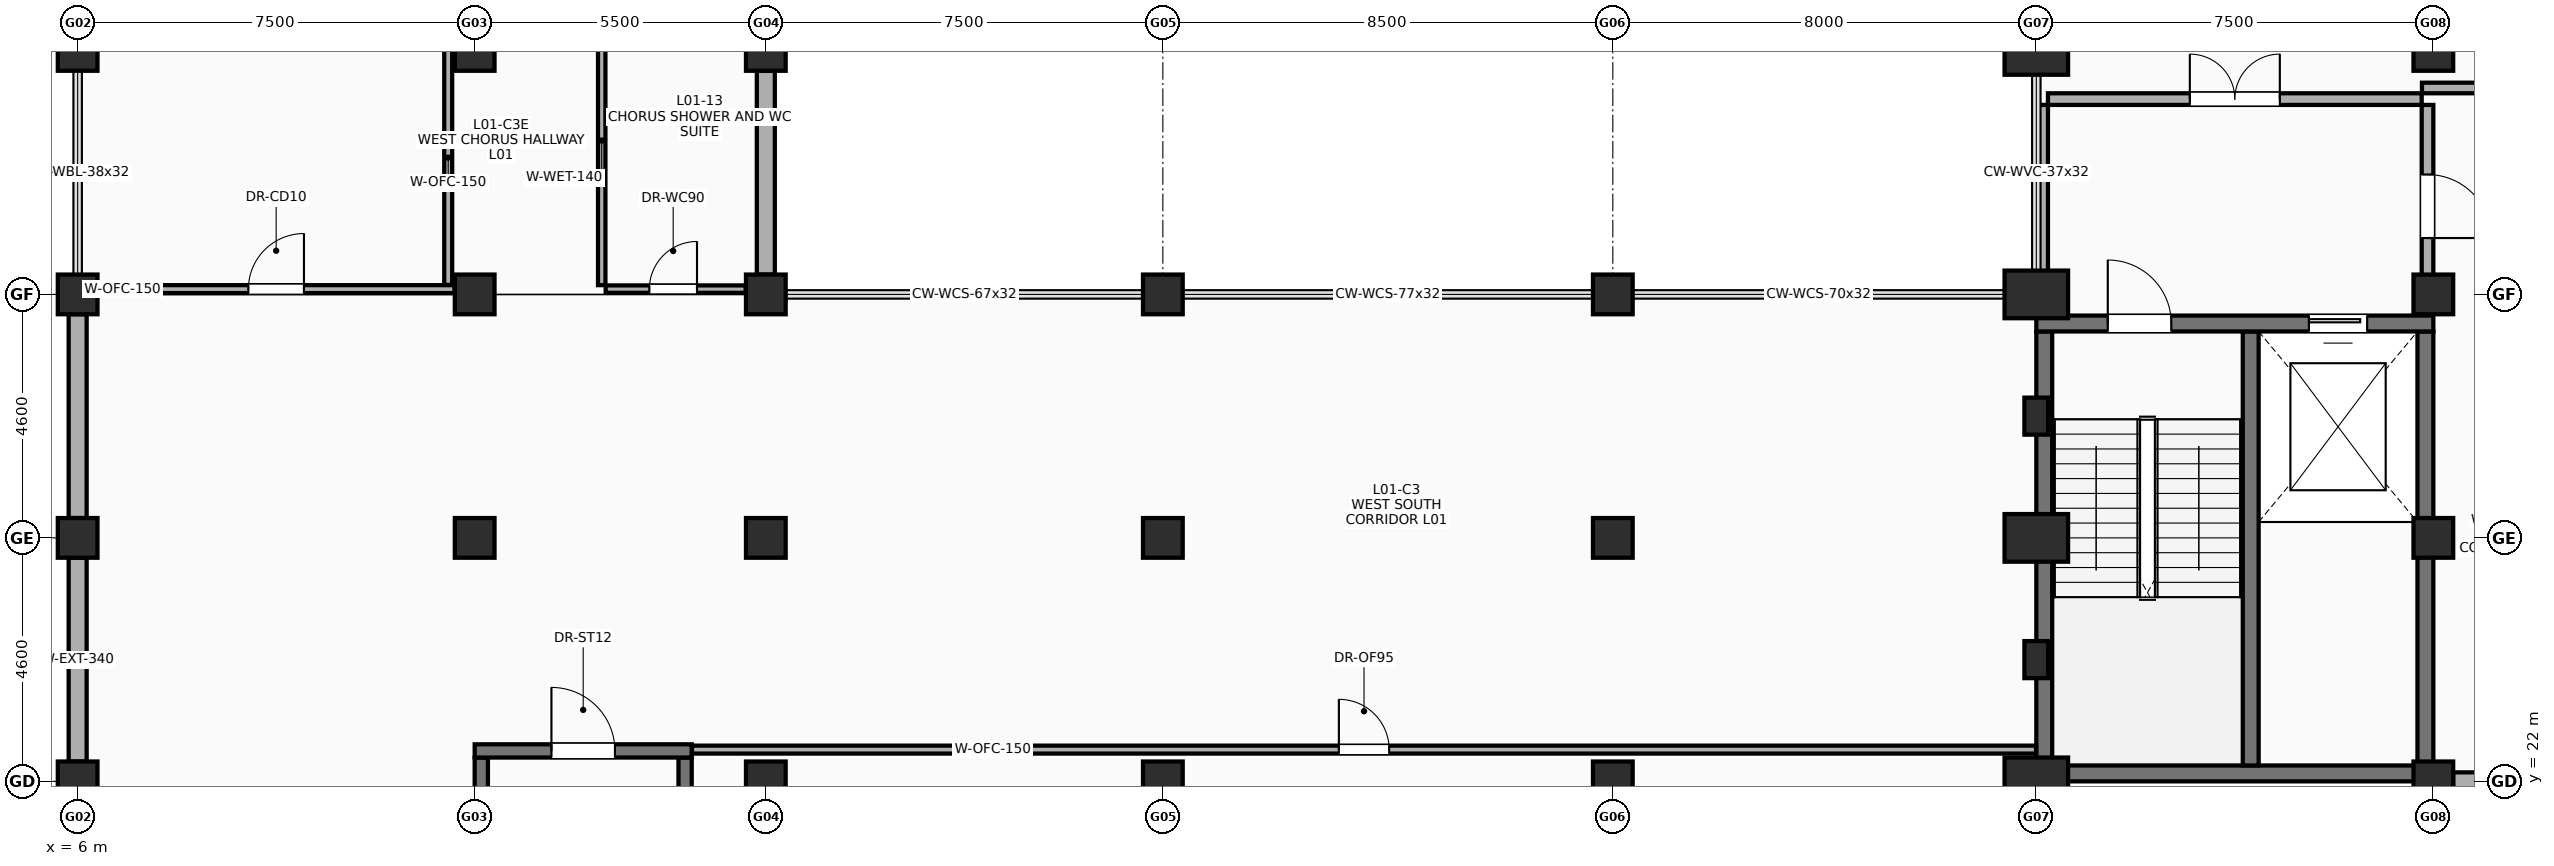
"""IFC4 building model, lengths in metres.
Left out: names, types, materials, properties, quantities, classifications, styles, units other than length and angle.
Written with IfcOpenShell. Run it as: python <this file> out.ifc"""

import sys

from ifc_helpers import new_model, si_unit, direction, frame, frame_2d, origin, origin_2d, place, context, subcontext, project, spatial, rectangle, extrude, element, fill, save


model = new_model("IFC4")
c1 = context("Model", 3, precision=1e-05, world=origin(), true_north=direction((0.0, 1.0)))
c2 = subcontext(c1, "Body", "Model", "MODEL_VIEW")
j1 = project(units=[si_unit("LENGTHUNIT", "METRE"), si_unit("PLANEANGLEUNIT", "RADIAN")], contexts=[c1])
p1 = place(None, origin())
s1 = spatial("IfcSite", under=j1, at=p1, CompositionType="ELEMENT")
p2 = place(p1, origin())
s2 = spatial("IfcBuilding", under=s1, at=p2, CompositionType="ELEMENT")
p3 = place(p2, frame((0.0, 0.0, 5.4)))
s3 = spatial("IfcBuildingStorey", under=s2, at=p3, CompositionType="ELEMENT", Elevation=5.4)
for number, where, z_axis, x_axis in (
    (1, (6.0, 22.0, 0.0), (0.0, 0.0, 1.0), (1.0, 0.0, 0.0)),
    (2, (6.0, 26.6, 0.0), (0.0, 0.0, 1.0), (1.0, 0.0, 0.0)),
    (3, (6.0, 31.2, 0.0), (0.0, 0.0, 1.0), (1.0, 0.0, 0.0)),
    (4, (6.0, 35.8, 0.0), (0.0, 0.0, 1.0), (1.0, 0.0, 0.0)),
    (5, (13.5, 26.6, 0.0), (0.0, 0.0, 1.0), (1.0, 0.0, 0.0)),
    (6, (13.5, 31.2, 0.0), (0.0, 0.0, 1.0), (1.0, 0.0, 0.0)),
    (7, (13.5, 35.8, 0.0), (0.0, 0.0, 1.0), (1.0, 0.0, 0.0)),
    (8, (19.0, 22.0, 0.0), (0.0, 0.0, 1.0), (1.0, 0.0, 0.0)),
    (9, (19.0, 26.6, 0.0), (0.0, 0.0, 1.0), (1.0, 0.0, 0.0)),
    (10, (19.0, 31.2, 0.0), (0.0, 0.0, 1.0), (1.0, 0.0, 0.0)),
    (11, (19.0, 35.8, 0.0), (0.0, 0.0, 1.0), (1.0, 0.0, 0.0)),
    (12, (26.5, 22.0, 0.0), (0.0, 0.0, 1.0), (1.0, 0.0, 0.0)),
    (13, (26.5, 26.6, 0.0), (0.0, 0.0, 1.0), (1.0, 0.0, 0.0)),
    (14, (26.5, 31.2, 0.0), (0.0, 0.0, 1.0), (1.0, 0.0, 0.0)),
    (15, (35.0, 22.0, 0.0), (0.0, 0.0, 1.0), (1.0, 0.0, 0.0)),
    (16, (35.0, 26.6, 0.0), (0.0, 0.0, 1.0), (1.0, 0.0, 0.0)),
    (17, (35.0, 31.2, 0.0), (0.0, 0.0, 1.0), (1.0, 0.0, 0.0)),
):
    element("IfcColumn", number, at=place(p3, frame(where, z_axis=z_axis, x_axis=x_axis)), inside=s3, PredefinedType="COLUMN", context=c2, shape_type="SweptSolid", body=[
        extrude(rectangle(XDim=0.75, YDim=0.75, at=origin_2d()), origin(), (0.0, 0.0, 1.0), 4.4),
    ])
for number, where, z_axis, x_axis in (
    (18, (43.0, 22.0, 0.0), (0.0, 0.0, 1.0), (1.0, 0.0, 0.0)),
    (19, (43.0, 26.6, 0.0), (0.0, 0.0, 1.0), (1.0, 0.0, 0.0)),
    (20, (43.0, 31.2, 0.0), (0.0, 0.0, 1.0), (1.0, 0.0, 0.0)),
    (21, (43.0, 35.8, 0.0), (0.0, 0.0, 1.0), (1.0, 0.0, 0.0)),
):
    element("IfcColumn", number, at=place(p3, frame(where, z_axis=z_axis, x_axis=x_axis)), inside=s3, PredefinedType="COLUMN", context=c2, shape_type="SweptSolid", body=[
        extrude(rectangle(XDim=1.2, YDim=0.9, at=origin_2d()), origin(), (0.0, 0.0, 1.0), 4.4),
    ])
for number, where, z_axis, x_axis in (
    (22, (50.5, 22.0, 0.0), (0.0, 0.0, 1.0), (1.0, 0.0, 0.0)),
    (23, (50.5, 26.6, 0.0), (0.0, 0.0, 1.0), (1.0, 0.0, 0.0)),
    (24, (50.5, 31.2, 0.0), (0.0, 0.0, 1.0), (1.0, 0.0, 0.0)),
    (25, (50.5, 35.8, 0.0), (0.0, 0.0, 1.0), (1.0, 0.0, 0.0)),
):
    element("IfcColumn", number, at=place(p3, frame(where, z_axis=z_axis, x_axis=x_axis)), inside=s3, PredefinedType="COLUMN", context=c2, shape_type="SweptSolid", body=[
        extrude(rectangle(XDim=0.75, YDim=0.75, at=origin_2d()), origin(), (0.0, 0.0, 1.0), 4.4),
    ])
for number, where, z_axis, x_axis in (
    (26, (43.0, 24.3, 0.0), (0.0, 0.0, 1.0), (1.0, 0.0, 0.0)),
    (27, (43.0, 28.9, 0.0), (0.0, 0.0, 1.0), (1.0, 0.0, 0.0)),
):
    element("IfcColumn", number, at=place(p3, frame(where, z_axis=z_axis, x_axis=x_axis)), inside=s3, PredefinedType="PILASTER", context=c2, shape_type="SweptSolid", body=[
        extrude(rectangle(XDim=0.45, YDim=0.7, at=origin_2d()), origin(), (0.0, 0.0, 1.0), 4.4),
    ])
p4 = place(p3, frame((43.0, 22.15, 0.0), z_axis=(0.0, 0.0, 1.0), x_axis=(1.0, 0.0, 0.0)))
e28 = element("IfcWall", 28, at=p4, inside=s3, PredefinedType="SHEAR", context=c2, shape_type="SweptSolid", body=[
    extrude(rectangle(XDim=7.5, YDim=0.3, at=frame_2d((3.75, 0.0))), origin(), (0.0, 0.0, 1.0), 4.4),
])
for number, where, z_axis, x_axis in (
    (29, (43.15, 22.3, 0.0), (0.0, 0.0, 1.0), (0.0, 1.0, 0.0)),
    (30, (50.35, 22.3, 0.0), (0.0, 0.0, 1.0), (0.0, 1.0, 0.0)),
    (31, (47.05, 22.3, 0.0), (0.0, 0.0, 1.0), (0.0, 1.0, 0.0)),
):
    element("IfcWall", number, at=place(p3, frame(where, z_axis=z_axis, x_axis=x_axis)), inside=s3, PredefinedType="SHEAR", context=c2, shape_type="SweptSolid", body=[
        extrude(rectangle(XDim=8.2, YDim=0.3, at=frame_2d((4.1, 0.0))), origin(), (0.0, 0.0, 1.0), 4.4),
    ])
p5 = place(p3, frame((6.0, 22.375, 0.0), z_axis=(0.0, 0.0, 1.0), x_axis=(0.0, 1.0, 0.0)))
e32 = element("IfcWall", 32, at=p5, inside=s3, PredefinedType="SOLIDWALL", context=c2, shape_type="SweptSolid", body=[
    extrude(rectangle(XDim=3.85, YDim=0.34, at=frame_2d((1.925, 0.0))), origin(), (0.0, 0.0, 1.0), 3.2),
])
p6 = place(p3, frame((6.0, 26.975, 0.0), z_axis=(0.0, 0.0, 1.0), x_axis=(0.0, 1.0, 0.0)))
e33 = element("IfcWall", 33, at=p6, inside=s3, PredefinedType="SOLIDWALL", context=c2, shape_type="SweptSolid", body=[
    extrude(rectangle(XDim=3.85, YDim=0.34, at=frame_2d((1.925, 0.0))), origin(), (0.0, 0.0, 1.0), 3.2),
])
p7 = place(p3, frame((19.0, 31.575, 0.0), z_axis=(0.0, 0.0, 1.0), x_axis=(0.0, 1.0, 0.0)))
e34 = element("IfcWall", 34, at=p7, inside=s3, PredefinedType="SOLIDWALL", context=c2, shape_type="SweptSolid", body=[
    extrude(rectangle(XDim=3.85, YDim=0.34, at=frame_2d((1.925, 0.0))), origin(), (0.0, 0.0, 1.0), 3.2),
])
p8 = place(p3, frame((43.0, 30.65, 0.0), z_axis=(0.0, 0.0, 1.0), x_axis=(1.0, 0.0, 0.0)))
e35 = element("IfcWall", 35, at=p8, inside=s3, PredefinedType="SHEAR", context=c2, shape_type="SweptSolid", body=[
    extrude(rectangle(XDim=7.5, YDim=0.3, at=frame_2d((3.75, 0.0))), origin(), (0.0, 0.0, 1.0), 4.4),
])
p9 = place(p8, frame((1.35, 0.0, 0.0)))
e36 = element("IfcOpeningElement", 36, at=p9, cuts=e35, PredefinedType="OPENING", context=c2, shape_type="SweptSolid", body=[
    extrude(rectangle(XDim=1.2, YDim=2.15, at=frame_2d((0.6, 1.075))), frame((0.0, 0.16, 0.0), z_axis=(0.0, -1.0, 0.0), x_axis=(1.0, 0.0, 0.0)), (0.0, 0.0, 1.0), 0.32),
])
p10 = place(p8, frame((5.15, 0.0, 0.0)))
e37 = element("IfcOpeningElement", 37, at=p10, cuts=e35, PredefinedType="OPENING", context=c2, shape_type="SweptSolid", body=[
    extrude(rectangle(XDim=1.1, YDim=2.15, at=frame_2d((0.55, 1.075))), frame((0.0, 0.16, 0.0), z_axis=(0.0, -1.0, 0.0), x_axis=(1.0, 0.0, 0.0)), (0.0, 0.0, 1.0), 0.32),
])
p11 = place(p3, frame((43.22, 34.89, 0.0), z_axis=(0.0, 0.0, 1.0), x_axis=(1.0, 0.0, 0.0)))
e38 = element("IfcWall", 38, at=p11, inside=s3, PredefinedType="SOLIDWALL", context=c2, shape_type="SweptSolid", body=[
    extrude(rectangle(XDim=7.06, YDim=0.22, at=frame_2d((3.53, 0.0))), origin(), (0.0, 0.0, 1.0), 3.5),
])
p12 = place(p11, frame((2.68, 0.0, 0.0)))
e39 = element("IfcOpeningElement", 39, at=p12, cuts=e38, PredefinedType="OPENING", context=c2, shape_type="SweptSolid", body=[
    extrude(rectangle(XDim=1.7, YDim=2.18, at=frame_2d((0.85, 1.09))), frame((0.0, 0.12, 0.0), z_axis=(0.0, -1.0, 0.0), x_axis=(1.0, 0.0, 0.0)), (0.0, 0.0, 1.0), 0.24),
])
p13 = place(p3, frame((43.11, 30.95, 0.0), z_axis=(0.0, 0.0, 1.0), x_axis=(0.0, 1.0, 0.0)))
e40 = element("IfcWall", 40, at=p13, inside=s3, PredefinedType="SOLIDWALL", context=c2, shape_type="SweptSolid", body=[
    extrude(rectangle(XDim=3.83, YDim=0.22, at=frame_2d((1.915, 0.0))), origin(), (0.0, 0.0, 1.0), 3.5),
])
p14 = place(p3, frame((50.39, 30.95, 0.0), z_axis=(0.0, 0.0, 1.0), x_axis=(0.0, 1.0, 0.0)))
e41 = element("IfcWall", 41, at=p14, inside=s3, PredefinedType="SOLIDWALL", context=c2, shape_type="SweptSolid", body=[
    extrude(rectangle(XDim=3.83, YDim=0.22, at=frame_2d((1.915, 0.0))), origin(), (0.0, 0.0, 1.0), 3.3),
])
p15 = place(p14, frame((2.515, 0.0, 0.0), z_axis=(0.0, 0.0, 1.0), x_axis=(-1.0, 0.0, 0.0)))
e42 = element("IfcOpeningElement", 42, at=p15, cuts=e41, PredefinedType="OPENING", context=c2, shape_type="SweptSolid", body=[
    extrude(rectangle(XDim=1.2, YDim=2.15, at=frame_2d((0.6, 1.075))), frame((0.0, 0.12, 0.0), z_axis=(0.0, -1.0, 0.0), x_axis=(1.0, 0.0, 0.0)), (0.0, 0.0, 1.0), 0.24),
])
for number, where, z_axis, x_axis in (
    (43, (13.625, 14.25, 0.0), (0.0, 0.0, 1.0), (0.0, 1.0, 0.0)),
    (44, (17.475, 14.25, 0.0), (0.0, 0.0, 1.0), (0.0, 1.0, 0.0)),
):
    element("IfcWall", number, at=place(p3, frame(where, z_axis=z_axis, x_axis=x_axis)), inside=s3, PredefinedType="SHEAR", context=c2, shape_type="SweptSolid", body=[
        extrude(rectangle(XDim=8.2, YDim=0.25, at=frame_2d((4.1, 0.0))), origin(), (0.0, 0.0, 1.0), 4.4),
    ])
p16 = place(p3, frame((13.5, 22.575, 0.0), z_axis=(0.0, 0.0, 1.0), x_axis=(1.0, 0.0, 0.0)))
e45 = element("IfcWall", 45, at=p16, inside=s3, PredefinedType="SHEAR", context=c2, shape_type="SweptSolid", body=[
    extrude(rectangle(XDim=4.1, YDim=0.25, at=frame_2d((2.05, 0.0))), origin(), (0.0, 0.0, 1.0), 4.4),
])
p17 = place(p16, frame((1.45, 0.0, 0.0)))
e46 = element("IfcOpeningElement", 46, at=p17, cuts=e45, PredefinedType="OPENING", context=c2, shape_type="SweptSolid", body=[
    extrude(rectangle(XDim=1.2, YDim=2.15, at=frame_2d((0.6, 1.075))), frame((0.0, 0.135, 0.0), z_axis=(0.0, -1.0, 0.0), x_axis=(1.0, 0.0, 0.0)), (0.0, 0.0, 1.0), 0.27),
])
p18 = place(p3, frame((50.285, 35.1, 0.0), z_axis=(0.0, 0.0, 1.0), x_axis=(1.0, 0.0, 0.0)))
e47 = element("IfcWall", 47, at=p18, inside=s3, PredefinedType="PARTITIONING", context=c2, shape_type="SweptSolid", body=[
    extrude(rectangle(XDim=22.5, YDim=0.2, at=frame_2d((11.25, 0.0))), origin(), (0.0, 0.0, 1.0), 3.5),
])
p19 = place(p18, frame((10.28, 0.0, 0.0)))
e48 = element("IfcOpeningElement", 48, at=p19, cuts=e47, PredefinedType="OPENING", context=c2, shape_type="SweptSolid", body=[
    extrude(rectangle(XDim=1.6, YDim=2.18, at=frame_2d((0.8, 1.09))), frame((0.0, 0.11, 0.0), z_axis=(0.0, -1.0, 0.0), x_axis=(1.0, 0.0, 0.0)), (0.0, 0.0, 1.0), 0.22),
])
p20 = place(p3, frame((6.38, 31.3, 0.0), z_axis=(0.0, 0.0, 1.0), x_axis=(1.0, 0.0, 0.0)))
e49 = element("IfcWall", 49, at=p20, inside=s3, PredefinedType="PARTITIONING", context=c2, shape_type="SweptSolid", body=[
    extrude(rectangle(XDim=6.74, YDim=0.15, at=frame_2d((3.37, 0.0))), origin(), (0.0, 0.0, 1.0), 3.3),
])
p21 = place(p20, frame((2.845, 0.0, 0.0)))
e50 = element("IfcOpeningElement", 50, at=p21, cuts=e49, PredefinedType="OPENING", context=c2, shape_type="SweptSolid", body=[
    extrude(rectangle(XDim=1.05, YDim=2.15, at=frame_2d((0.525, 1.075))), frame((0.0, 0.085, 0.0), z_axis=(0.0, -1.0, 0.0), x_axis=(1.0, 0.0, 0.0)), (0.0, 0.0, 1.0), 0.17),
])
p22 = place(p3, frame((15.9, 31.375, 0.0), z_axis=(0.0, 0.0, 1.0), x_axis=(0.0, 1.0, 0.0)))
e51 = element("IfcWall", 51, at=p22, inside=s3, PredefinedType="PARTITIONING", context=c2, shape_type="SweptSolid", body=[
    extrude(rectangle(XDim=13.97, YDim=0.14, at=frame_2d((6.985, 0.0))), origin(), (0.0, 0.0, 1.0), 3.5),
])
p23 = place(p22, frame((6.275, 0.0, 0.0)))
e52 = element("IfcOpeningElement", 52, at=p23, cuts=e51, PredefinedType="OPENING", context=c2, shape_type="SweptSolid", body=[
    extrude(rectangle(XDim=0.9, YDim=2.1, at=frame_2d((0.45, 1.05))), frame((0.0, 0.08, 0.0), z_axis=(0.0, -1.0, 0.0), x_axis=(1.0, 0.0, 0.0)), (0.0, 0.0, 1.0), 0.16),
])
p24 = place(p3, frame((15.975, 31.3, 0.0), z_axis=(0.0, 0.0, 1.0), x_axis=(1.0, 0.0, 0.0)))
e53 = element("IfcWall", 53, at=p24, inside=s3, PredefinedType="PARTITIONING", context=c2, shape_type="SweptSolid", body=[
    extrude(rectangle(XDim=2.645, YDim=0.14, at=frame_2d((1.323, 0.0))), origin(), (0.0, 0.0, 1.0), 3.5),
])
p25 = place(p24, frame((0.825, 0.0, 0.0)))
e54 = element("IfcOpeningElement", 54, at=p25, cuts=e53, PredefinedType="OPENING", context=c2, shape_type="SweptSolid", body=[
    extrude(rectangle(XDim=0.9, YDim=2.1, at=frame_2d((0.45, 1.05))), frame((0.0, 0.08, 0.0), z_axis=(0.0, -1.0, 0.0), x_axis=(1.0, 0.0, 0.0)), (0.0, 0.0, 1.0), 0.16),
])
p26 = place(p3, frame((17.605, 22.6, 0.0), z_axis=(0.0, 0.0, 1.0), x_axis=(1.0, 0.0, 0.0)))
e55 = element("IfcWall", 55, at=p26, inside=s3, PredefinedType="PARTITIONING", context=c2, shape_type="SweptSolid", body=[
    extrude(rectangle(XDim=25.39, YDim=0.15, at=frame_2d((12.695, 0.0))), origin(), (0.0, 0.0, 1.0), 3.5),
])
p27 = place(p26, frame((12.22, 0.0, 0.0)))
e56 = element("IfcOpeningElement", 56, at=p27, cuts=e55, PredefinedType="OPENING", context=c2, shape_type="SweptSolid", body=[
    extrude(rectangle(XDim=0.95, YDim=2.15, at=frame_2d((0.475, 1.075))), frame((0.0, 0.085, 0.0), z_axis=(0.0, -1.0, 0.0), x_axis=(1.0, 0.0, 0.0)), (0.0, 0.0, 1.0), 0.17),
])
p28 = place(p3, frame((13.0, 31.38, 0.0), z_axis=(0.0, 0.0, 1.0), x_axis=(0.0, 1.0, 0.0)))
e57 = element("IfcWall", 57, at=p28, inside=s3, PredefinedType="PARTITIONING", context=c2, shape_type="SweptSolid", body=[
    extrude(rectangle(XDim=4.81, YDim=0.15, at=frame_2d((2.405, 0.0))), origin(), (0.0, 0.0, 1.0), 3.3),
])
p29 = place(p3, frame((50.875, 22.0, 0.0), z_axis=(0.0, 0.0, 1.0), x_axis=(1.0, 0.0, 0.0)))
e58 = element("IfcWall", 58, at=p29, inside=s3, PredefinedType="SOLIDWALL", context=c2, shape_type="SweptSolid", body=[
    extrude(rectangle(XDim=0.905, YDim=0.34, at=frame_2d((0.453, 0.0))), origin(), (0.0, 0.0, 1.0), 3.2),
])
p30 = place(p9, origin())
e59 = element("IfcDoor", 59, at=p30, inside=s3, OperationType="SINGLE_SWING_LEFT", PredefinedType="DOOR", context=c2, shape_type="SweptSolid", body=[
    extrude(rectangle(XDim=1.2, YDim=2.15, at=frame_2d((0.6, 1.075))), frame((0.0, 0.025, 0.0), z_axis=(0.0, -1.0, 0.0), x_axis=(1.0, 0.0, 0.0)), (0.0, 0.0, 1.0), 0.05),
])
fill(e36, e59)
p31 = place(p10, origin())
e60 = element("IfcDoor", 60, at=p31, inside=s3, OperationType="SLIDING_TO_LEFT", PredefinedType="DOOR", context=c2, shape_type="SweptSolid", body=[
    extrude(rectangle(XDim=1.1, YDim=2.15, at=frame_2d((0.55, 1.075))), frame((0.0, 0.025, 0.0), z_axis=(0.0, -1.0, 0.0), x_axis=(1.0, 0.0, 0.0)), (0.0, 0.0, 1.0), 0.05),
])
fill(e37, e60)
p32 = place(p12, origin())
e61 = element("IfcDoor", 61, at=p32, inside=s3, OperationType="DOUBLE_DOOR_SINGLE_SWING", PredefinedType="DOOR", context=c2, shape_type="SweptSolid", body=[
    extrude(rectangle(XDim=1.7, YDim=2.18, at=frame_2d((0.85, 1.09))), frame((0.0, 0.025, 0.0), z_axis=(0.0, -1.0, 0.0), x_axis=(1.0, 0.0, 0.0)), (0.0, 0.0, 1.0), 0.05),
])
fill(e39, e61)
p33 = place(p15, origin())
e62 = element("IfcDoor", 62, at=p33, inside=s3, OperationType="SINGLE_SWING_RIGHT", PredefinedType="DOOR", context=c2, shape_type="SweptSolid", body=[
    extrude(rectangle(XDim=1.2, YDim=2.15, at=frame_2d((0.6, 1.075))), frame((0.0, 0.025, 0.0), z_axis=(0.0, -1.0, 0.0), x_axis=(1.0, 0.0, 0.0)), (0.0, 0.0, 1.0), 0.05),
])
fill(e42, e62)
p34 = place(p17, origin())
e63 = element("IfcDoor", 63, at=p34, inside=s3, OperationType="SINGLE_SWING_LEFT", PredefinedType="DOOR", context=c2, shape_type="SweptSolid", body=[
    extrude(rectangle(XDim=1.2, YDim=2.15, at=frame_2d((0.6, 1.075))), frame((0.0, 0.025, 0.0), z_axis=(0.0, -1.0, 0.0), x_axis=(1.0, 0.0, 0.0)), (0.0, 0.0, 1.0), 0.05),
])
fill(e46, e63)
p35 = place(p21, origin())
e64 = element("IfcDoor", 64, at=p35, inside=s3, OperationType="SINGLE_SWING_RIGHT", PredefinedType="DOOR", context=c2, shape_type="SweptSolid", body=[
    extrude(rectangle(XDim=1.05, YDim=2.15, at=frame_2d((0.525, 1.075))), frame((0.0, 0.025, 0.0), z_axis=(0.0, -1.0, 0.0), x_axis=(1.0, 0.0, 0.0)), (0.0, 0.0, 1.0), 0.05),
])
fill(e50, e64)
p36 = place(p25, origin())
e65 = element("IfcDoor", 65, at=p36, inside=s3, OperationType="SINGLE_SWING_RIGHT", PredefinedType="DOOR", context=c2, shape_type="SweptSolid", body=[
    extrude(rectangle(XDim=0.9, YDim=2.1, at=frame_2d((0.45, 1.05))), frame((0.0, 0.025, 0.0), z_axis=(0.0, -1.0, 0.0), x_axis=(1.0, 0.0, 0.0)), (0.0, 0.0, 1.0), 0.05),
])
fill(e54, e65)
p37 = place(p27, origin())
e66 = element("IfcDoor", 66, at=p37, inside=s3, OperationType="SINGLE_SWING_LEFT", PredefinedType="DOOR", context=c2, shape_type="SweptSolid", body=[
    extrude(rectangle(XDim=0.95, YDim=2.15, at=frame_2d((0.475, 1.075))), frame((0.0, 0.025, 0.0), z_axis=(0.0, -1.0, 0.0), x_axis=(1.0, 0.0, 0.0)), (0.0, 0.0, 1.0), 0.05),
])
fill(e56, e66)
save(model, sys.argv[1])
